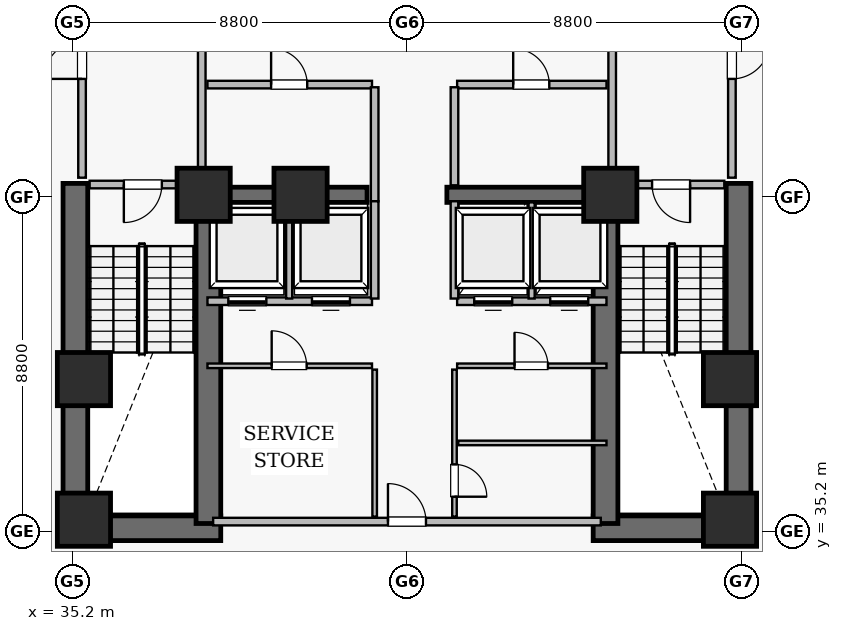
"""IFC4 building model, lengths in metres.
Left out: names, types, materials, properties, quantities, classifications, styles, units other than length and angle.
Written with IfcOpenShell. Run it as: python <this file> out.ifc"""

import sys

from ifc_helpers import new_model, si_unit, direction, frame, frame_2d, origin, origin_2d, place, context, subcontext, project, spatial, rectangle, extrude, element, fill, save


model = new_model("IFC4")
c1 = context("Model", 3, precision=1e-05, world=origin(), true_north=direction((0.0, 1.0)))
c2 = subcontext(c1, "Body", "Model", "MODEL_VIEW")
j1 = project(units=[si_unit("LENGTHUNIT", "METRE"), si_unit("PLANEANGLEUNIT", "RADIAN")], contexts=[c1])
p1 = place(None, origin())
s1 = spatial("IfcSite", under=j1, at=p1, CompositionType="ELEMENT")
p2 = place(p1, origin())
s2 = spatial("IfcBuilding", under=s1, at=p2, CompositionType="ELEMENT")
p3 = place(p2, frame((0.0, 0.0, -3.9)))
s3 = spatial("IfcBuildingStorey", under=s2, at=p3, CompositionType="ELEMENT", Elevation=-3.9)
for number, where, z_axis, x_axis in (
    (1, (34.95, 35.275, 0.0), (0.0, 0.0, 1.0), (1.0, 0.0, 0.0)),
    (2, (48.9, 35.275, 0.0), (0.0, 0.0, 1.0), (1.0, 0.0, 0.0)),
):
    element("IfcWall", number, at=place(p3, frame(where, z_axis=z_axis, x_axis=x_axis)), inside=s3, PredefinedType="SHEAR", context=c2, shape_type="SweptSolid", body=[
        extrude(rectangle(XDim=4.15, YDim=0.65, at=frame_2d((2.075, 0.0))), origin(), (0.0, 0.0, 1.0), 3.6),
    ])
for number, where, z_axis, x_axis in (
    (3, (35.275, 34.95, 0.0), (0.0, 0.0, 1.0), (0.0, 1.0, 0.0)),
    (4, (52.725, 34.95, 0.0), (0.0, 0.0, 1.0), (0.0, 1.0, 0.0)),
):
    element("IfcWall", number, at=place(p3, frame(where, z_axis=z_axis, x_axis=x_axis)), inside=s3, PredefinedType="SHEAR", context=c2, shape_type="SweptSolid", body=[
        extrude(rectangle(XDim=9.4, YDim=0.65, at=frame_2d((4.7, 0.0))), origin(), (0.0, 0.0, 1.0), 3.6),
    ])
for number, where, z_axis, x_axis in (
    (5, (38.775, 35.4, 0.0), (0.0, 0.0, 1.0), (0.0, 1.0, 0.0)),
    (6, (49.225, 35.4, 0.0), (0.0, 0.0, 1.0), (0.0, 1.0, 0.0)),
):
    element("IfcWall", number, at=place(p3, frame(where, z_axis=z_axis, x_axis=x_axis)), inside=s3, PredefinedType="SHEAR", context=c2, shape_type="SweptSolid", body=[
        extrude(rectangle(XDim=8.95, YDim=0.65, at=frame_2d((4.475, 0.0))), origin(), (0.0, 0.0, 1.0), 3.6),
    ])
for number, where, z_axis, x_axis in (
    (7, (38.75, 44.05, 0.0), (0.0, 0.0, 1.0), (1.0, 0.0, 0.0)),
    (8, (45.05, 44.05, 0.0), (0.0, 0.0, 1.0), (1.0, 0.0, 0.0)),
):
    element("IfcWall", number, at=place(p3, frame(where, z_axis=z_axis, x_axis=x_axis)), inside=s3, PredefinedType="SHEAR", context=c2, shape_type="SweptSolid", body=[
        extrude(rectangle(XDim=4.2, YDim=0.4, at=frame_2d((2.1, 0.0))), origin(), (0.0, 0.0, 1.0), 3.6),
    ])
for number, where, z_axis, x_axis in (
    (9, (35.5, 35.5, 0.0), (0.0, 0.0, 1.0), (1.0, 0.0, 0.0)),
    (10, (38.65, 44.05, 0.0), (0.0, 0.0, 1.0), (1.0, 0.0, 0.0)),
    (11, (52.5, 35.5, 0.0), (0.0, 0.0, 1.0), (1.0, 0.0, 0.0)),
    (12, (52.5, 39.2, 0.0), (0.0, 0.0, 1.0), (1.0, 0.0, 0.0)),
    (13, (49.35, 44.05, 0.0), (0.0, 0.0, 1.0), (1.0, 0.0, 0.0)),
    (14, (35.5, 39.2, 0.0), (0.0, 0.0, 1.0), (1.0, 0.0, 0.0)),
    (15, (41.2, 44.05, 0.0), (0.0, 0.0, 1.0), (1.0, 0.0, 0.0)),
):
    element("IfcColumn", number, at=place(p3, frame(where, z_axis=z_axis, x_axis=x_axis)), inside=s3, PredefinedType="COLUMN", context=c2, shape_type="SweptSolid", body=[
        extrude(rectangle(XDim=1.4, YDim=1.4, at=origin_2d()), origin(), (0.0, 0.0, 1.0), 3.9),
    ])
p4 = place(p3, frame((38.9, 35.45, 0.0), z_axis=(0.0, 0.0, 1.0), x_axis=(1.0, 0.0, 0.0)))
e16 = element("IfcWall", 16, at=p4, inside=s3, PredefinedType="SOLIDWALL", context=c2, shape_type="SweptSolid", body=[
    extrude(rectangle(XDim=10.2, YDim=0.2, at=frame_2d((5.1, 0.0))), origin(), (0.0, 0.0, 1.0), 3.6),
])
p5 = place(p4, frame((4.6, 0.0, 0.0)))
e17 = element("IfcOpeningElement", 17, at=p5, cuts=e16, PredefinedType="OPENING", context=c2, shape_type="SweptSolid", body=[
    extrude(rectangle(XDim=1.0, YDim=2.15, at=frame_2d((0.5, 1.075))), frame((0.0, 0.11, 0.0), z_axis=(0.0, -1.0, 0.0), x_axis=(1.0, 0.0, 0.0)), (0.0, 0.0, 1.0), 0.22),
])
p6 = place(p3, frame((35.45, 44.5, 0.0), z_axis=(0.0, 0.0, 1.0), x_axis=(0.0, 1.0, 0.0)))
e18 = element("IfcWall", 18, at=p6, inside=s3, PredefinedType="SOLIDWALL", context=c2, shape_type="SweptSolid", body=[
    extrude(rectangle(XDim=7.92, YDim=0.2, at=frame_2d((3.96, 0.0))), origin(), (0.0, 0.0, 1.0), 3.6),
])
p7 = place(p6, frame((2.6, 0.0, 0.0)))
e19 = element("IfcOpeningElement", 19, at=p7, cuts=e18, PredefinedType="OPENING", context=c2, shape_type="SweptSolid", body=[
    extrude(rectangle(XDim=1.0, YDim=2.15, at=frame_2d((0.5, 1.075))), frame((0.0, 0.11, 0.0), z_axis=(0.0, -1.0, 0.0), x_axis=(1.0, 0.0, 0.0)), (0.0, 0.0, 1.0), 0.22),
])
p8 = place(p3, frame((52.55, 44.5, 0.0), z_axis=(0.0, 0.0, 1.0), x_axis=(0.0, 1.0, 0.0)))
e20 = element("IfcWall", 20, at=p8, inside=s3, PredefinedType="SOLIDWALL", context=c2, shape_type="SweptSolid", body=[
    extrude(rectangle(XDim=7.92, YDim=0.2, at=frame_2d((3.96, 0.0))), origin(), (0.0, 0.0, 1.0), 3.6),
])
p9 = place(p8, frame((2.6, 0.0, 0.0)))
e21 = element("IfcOpeningElement", 21, at=p9, cuts=e20, PredefinedType="OPENING", context=c2, shape_type="SweptSolid", body=[
    extrude(rectangle(XDim=1.0, YDim=2.15, at=frame_2d((0.5, 1.075))), frame((0.0, 0.11, 0.0), z_axis=(0.0, -1.0, 0.0), x_axis=(1.0, 0.0, 0.0)), (0.0, 0.0, 1.0), 0.22),
])
p10 = place(p3, frame((38.6, 44.5, 0.0), z_axis=(0.0, 0.0, 1.0), x_axis=(0.0, 1.0, 0.0)))
e22 = element("IfcWall", 22, at=p10, inside=s3, PredefinedType="SOLIDWALL", context=c2, shape_type="SweptSolid", body=[
    extrude(rectangle(XDim=7.92, YDim=0.2, at=frame_2d((3.96, 0.0))), origin(), (0.0, 0.0, 1.0), 3.6),
])
p11 = place(p10, frame((3.425, 0.0, 0.0)))
e23 = element("IfcOpeningElement", 23, at=p11, cuts=e22, PredefinedType="OPENING", context=c2, shape_type="SweptSolid", body=[
    extrude(rectangle(XDim=0.95, YDim=2.15, at=frame_2d((0.475, 1.075))), frame((0.0, 0.11, 0.0), z_axis=(0.0, -1.0, 0.0), x_axis=(1.0, 0.0, 0.0)), (0.0, 0.0, 1.0), 0.22),
])
p12 = place(p3, frame((49.4, 44.5, 0.0), z_axis=(0.0, 0.0, 1.0), x_axis=(0.0, 1.0, 0.0)))
e24 = element("IfcWall", 24, at=p12, inside=s3, PredefinedType="SOLIDWALL", context=c2, shape_type="SweptSolid", body=[
    extrude(rectangle(XDim=7.92, YDim=0.2, at=frame_2d((3.96, 0.0))), origin(), (0.0, 0.0, 1.0), 3.6),
])
p13 = place(p12, frame((3.425, 0.0, 0.0)))
e25 = element("IfcOpeningElement", 25, at=p13, cuts=e24, PredefinedType="OPENING", context=c2, shape_type="SweptSolid", body=[
    extrude(rectangle(XDim=0.95, YDim=2.15, at=frame_2d((0.475, 1.075))), frame((0.0, 0.11, 0.0), z_axis=(0.0, -1.0, 0.0), x_axis=(1.0, 0.0, 0.0)), (0.0, 0.0, 1.0), 0.22),
])
p14 = place(p3, frame((38.75, 46.95, 0.0), z_axis=(0.0, 0.0, 1.0), x_axis=(1.0, 0.0, 0.0)))
e26 = element("IfcWall", 26, at=p14, inside=s3, PredefinedType="SOLIDWALL", context=c2, shape_type="SweptSolid", body=[
    extrude(rectangle(XDim=4.33, YDim=0.2, at=frame_2d((2.165, 0.0))), origin(), (0.0, 0.0, 1.0), 3.6),
])
p15 = place(p14, frame((1.675, 0.0, 0.0)))
e27 = element("IfcOpeningElement", 27, at=p15, cuts=e26, PredefinedType="OPENING", context=c2, shape_type="SweptSolid", body=[
    extrude(rectangle(XDim=0.95, YDim=2.15, at=frame_2d((0.475, 1.075))), frame((0.0, 0.11, 0.0), z_axis=(0.0, -1.0, 0.0), x_axis=(1.0, 0.0, 0.0)), (0.0, 0.0, 1.0), 0.22),
])
p16 = place(p3, frame((38.75, 41.25, 0.0), z_axis=(0.0, 0.0, 1.0), x_axis=(1.0, 0.0, 0.0)))
e28 = element("IfcWall", 28, at=p16, inside=s3, PredefinedType="SOLIDWALL", context=c2, shape_type="SweptSolid", body=[
    extrude(rectangle(XDim=4.33, YDim=0.2, at=frame_2d((2.165, 0.0))), origin(), (0.0, 0.0, 1.0), 3.6),
])
p17 = place(p16, frame((0.55, 0.0, 0.0)))
e29 = element("IfcOpeningElement", 29, at=p17, cuts=e28, PredefinedType="OPENING", context=c2, shape_type="SweptSolid", body=[
    extrude(rectangle(XDim=1.0, YDim=2.15, at=frame_2d((0.5, 1.075))), frame((0.0, 0.11, 0.0), z_axis=(0.0, -1.0, 0.0), x_axis=(1.0, 0.0, 0.0)), (0.0, 0.0, 1.0), 0.22),
])
p18 = place(p16, frame((2.75, 0.0, 0.0)))
e30 = element("IfcOpeningElement", 30, at=p18, cuts=e28, PredefinedType="OPENING", context=c2, shape_type="SweptSolid", body=[
    extrude(rectangle(XDim=1.0, YDim=2.15, at=frame_2d((0.5, 1.075))), frame((0.0, 0.11, 0.0), z_axis=(0.0, -1.0, 0.0), x_axis=(1.0, 0.0, 0.0)), (0.0, 0.0, 1.0), 0.22),
])
p19 = place(p3, frame((38.75, 39.55, 0.0), z_axis=(0.0, 0.0, 1.0), x_axis=(1.0, 0.0, 0.0)))
e31 = element("IfcWall", 31, at=p19, inside=s3, PredefinedType="PARTITIONING", context=c2, shape_type="SweptSolid", body=[
    extrude(rectangle(XDim=4.33, YDim=0.12, at=frame_2d((2.165, 0.0))), origin(), (0.0, 0.0, 1.0), 3.6),
])
p20 = place(p19, frame((1.69, 0.0, 0.0)))
e32 = element("IfcOpeningElement", 32, at=p20, cuts=e31, PredefinedType="OPENING", context=c2, shape_type="SweptSolid", body=[
    extrude(rectangle(XDim=0.92, YDim=2.1, at=frame_2d((0.46, 1.05))), frame((0.0, 0.07, 0.0), z_axis=(0.0, -1.0, 0.0), x_axis=(1.0, 0.0, 0.0)), (0.0, 0.0, 1.0), 0.14),
])
p21 = place(p3, frame((45.32, 46.95, 0.0), z_axis=(0.0, 0.0, 1.0), x_axis=(1.0, 0.0, 0.0)))
e33 = element("IfcWall", 33, at=p21, inside=s3, PredefinedType="SOLIDWALL", context=c2, shape_type="SweptSolid", body=[
    extrude(rectangle(XDim=3.93, YDim=0.2, at=frame_2d((1.965, 0.0))), origin(), (0.0, 0.0, 1.0), 2.938),
])
p22 = place(p21, frame((1.475, 0.0, 0.0)))
e34 = element("IfcOpeningElement", 34, at=p22, cuts=e33, PredefinedType="OPENING", context=c2, shape_type="SweptSolid", body=[
    extrude(rectangle(XDim=0.95, YDim=2.15, at=frame_2d((0.475, 1.075))), frame((0.0, 0.11, 0.0), z_axis=(0.0, -1.0, 0.0), x_axis=(1.0, 0.0, 0.0)), (0.0, 0.0, 1.0), 0.22),
])
p23 = place(p3, frame((45.32, 41.25, 0.0), z_axis=(0.0, 0.0, 1.0), x_axis=(1.0, 0.0, 0.0)))
e35 = element("IfcWall", 35, at=p23, inside=s3, PredefinedType="SOLIDWALL", context=c2, shape_type="SweptSolid", body=[
    extrude(rectangle(XDim=3.93, YDim=0.2, at=frame_2d((1.965, 0.0))), origin(), (0.0, 0.0, 1.0), 3.6),
])
p24 = place(p23, frame((0.45, 0.0, 0.0)))
e36 = element("IfcOpeningElement", 36, at=p24, cuts=e35, PredefinedType="OPENING", context=c2, shape_type="SweptSolid", body=[
    extrude(rectangle(XDim=1.0, YDim=2.15, at=frame_2d((0.5, 1.075))), frame((0.0, 0.11, 0.0), z_axis=(0.0, -1.0, 0.0), x_axis=(1.0, 0.0, 0.0)), (0.0, 0.0, 1.0), 0.22),
])
p25 = place(p23, frame((2.45, 0.0, 0.0)))
e37 = element("IfcOpeningElement", 37, at=p25, cuts=e35, PredefinedType="OPENING", context=c2, shape_type="SweptSolid", body=[
    extrude(rectangle(XDim=1.0, YDim=2.15, at=frame_2d((0.5, 1.075))), frame((0.0, 0.11, 0.0), z_axis=(0.0, -1.0, 0.0), x_axis=(1.0, 0.0, 0.0)), (0.0, 0.0, 1.0), 0.22),
])
p26 = place(p3, frame((45.32, 39.55, 0.0), z_axis=(0.0, 0.0, 1.0), x_axis=(1.0, 0.0, 0.0)))
e38 = element("IfcWall", 38, at=p26, inside=s3, PredefinedType="PARTITIONING", context=c2, shape_type="SweptSolid", body=[
    extrude(rectangle(XDim=3.93, YDim=0.12, at=frame_2d((1.965, 0.0))), origin(), (0.0, 0.0, 1.0), 3.6),
])
p27 = place(p26, frame((1.51, 0.0, 0.0)))
e39 = element("IfcOpeningElement", 39, at=p27, cuts=e38, PredefinedType="OPENING", context=c2, shape_type="SweptSolid", body=[
    extrude(rectangle(XDim=0.88, YDim=2.1, at=frame_2d((0.44, 1.05))), frame((0.0, 0.07, 0.0), z_axis=(0.0, -1.0, 0.0), x_axis=(1.0, 0.0, 0.0)), (0.0, 0.0, 1.0), 0.14),
])
p28 = place(p3, frame((45.25, 35.58, 0.0), z_axis=(0.0, 0.0, 1.0), x_axis=(0.0, 1.0, 0.0)))
e40 = element("IfcWall", 40, at=p28, inside=s3, PredefinedType="PARTITIONING", context=c2, shape_type="SweptSolid", body=[
    extrude(rectangle(XDim=3.87, YDim=0.12, at=frame_2d((1.935, 0.0))), origin(), (0.0, 0.0, 1.0), 3.6),
])
p29 = place(p28, frame((0.525, 0.0, 0.0)))
e41 = element("IfcOpeningElement", 41, at=p29, cuts=e40, PredefinedType="OPENING", context=c2, shape_type="SweptSolid", body=[
    extrude(rectangle(XDim=0.85, YDim=2.1, at=frame_2d((0.425, 1.05))), frame((0.0, 0.07, 0.0), z_axis=(0.0, -1.0, 0.0), x_axis=(1.0, 0.0, 0.0)), (0.0, 0.0, 1.0), 0.14),
])
p30 = place(p3, frame((35.65, 44.32, 0.0), z_axis=(0.0, 0.0, 1.0), x_axis=(1.0, 0.0, 0.0)))
e42 = element("IfcWall", 42, at=p30, inside=s3, PredefinedType="SOLIDWALL", context=c2, shape_type="SweptSolid", body=[
    extrude(rectangle(XDim=2.8, YDim=0.2, at=frame_2d((1.4, 0.0))), origin(), (0.0, 0.0, 1.0), 3.6),
])
p31 = place(p30, frame((0.9, 0.0, 0.0)))
e43 = element("IfcOpeningElement", 43, at=p31, cuts=e42, PredefinedType="OPENING", context=c2, shape_type="SweptSolid", body=[
    extrude(rectangle(XDim=1.0, YDim=2.15, at=frame_2d((0.5, 1.075))), frame((0.0, 0.11, 0.0), z_axis=(0.0, -1.0, 0.0), x_axis=(1.0, 0.0, 0.0)), (0.0, 0.0, 1.0), 0.22),
])
p32 = place(p3, frame((49.55, 44.32, 0.0), z_axis=(0.0, 0.0, 1.0), x_axis=(1.0, 0.0, 0.0)))
e44 = element("IfcWall", 44, at=p32, inside=s3, PredefinedType="SOLIDWALL", context=c2, shape_type="SweptSolid", body=[
    extrude(rectangle(XDim=2.8, YDim=0.2, at=frame_2d((1.4, 0.0))), origin(), (0.0, 0.0, 1.0), 3.6),
])
p33 = place(p32, frame((0.9, 0.0, 0.0)))
e45 = element("IfcOpeningElement", 45, at=p33, cuts=e44, PredefinedType="OPENING", context=c2, shape_type="SweptSolid", body=[
    extrude(rectangle(XDim=1.0, YDim=2.15, at=frame_2d((0.5, 1.075))), frame((0.0, 0.11, 0.0), z_axis=(0.0, -1.0, 0.0), x_axis=(1.0, 0.0, 0.0)), (0.0, 0.0, 1.0), 0.22),
])
p34 = place(p3, frame((45.35, 37.52, 0.0), z_axis=(0.0, 0.0, 1.0), x_axis=(1.0, 0.0, 0.0)))
e46 = element("IfcWall", 46, at=p34, inside=s3, PredefinedType="PARTITIONING", context=c2, shape_type="SweptSolid", body=[
    extrude(rectangle(XDim=3.9, YDim=0.12, at=frame_2d((1.95, 0.0))), origin(), (0.0, 0.0, 1.0), 3.6),
])
p35 = place(p3, frame((43.15, 35.58, 0.0), z_axis=(0.0, 0.0, 1.0), x_axis=(0.0, 1.0, 0.0)))
e47 = element("IfcWall", 47, at=p35, inside=s3, PredefinedType="PARTITIONING", context=c2, shape_type="SweptSolid", body=[
    extrude(rectangle(XDim=3.87, YDim=0.12, at=frame_2d((1.935, 0.0))), origin(), (0.0, 0.0, 1.0), 3.6),
])
p36 = place(p3, frame((43.15, 43.88, 0.0), z_axis=(0.0, 0.0, 1.0), x_axis=(0.0, 1.0, 0.0)))
e48 = element("IfcWall", 48, at=p36, inside=s3, PredefinedType="SOLIDWALL", context=c2, shape_type="SweptSolid", body=[
    extrude(rectangle(XDim=3.0, YDim=0.2, at=frame_2d((1.5, 0.0))), origin(), (0.0, 0.0, 1.0), 3.6),
])
p37 = place(p3, frame((45.25, 44.3, 0.0), z_axis=(0.0, 0.0, 1.0), x_axis=(0.0, 1.0, 0.0)))
e49 = element("IfcWall", 49, at=p37, inside=s3, PredefinedType="SOLIDWALL", context=c2, shape_type="SweptSolid", body=[
    extrude(rectangle(XDim=2.58, YDim=0.2, at=frame_2d((1.29, 0.0))), origin(), (0.0, 0.0, 1.0), 3.6),
])
for number, where, z_axis, x_axis in (
    (50, (43.15, 41.32, 0.0), (0.0, 0.0, 1.0), (0.0, 1.0, 0.0)),
    (51, (45.25, 41.32, 0.0), (0.0, 0.0, 1.0), (0.0, 1.0, 0.0)),
):
    element("IfcWall", number, at=place(p3, frame(where, z_axis=z_axis, x_axis=x_axis)), inside=s3, PredefinedType="SOLIDWALL", context=c2, shape_type="SweptSolid", body=[
        extrude(rectangle(XDim=2.56, YDim=0.2, at=frame_2d((1.28, 0.0))), origin(), (0.0, 0.0, 1.0), 3.6),
    ])
for number, where, z_axis, x_axis in (
    (52, (40.9, 41.32, 0.0), (0.0, 0.0, 1.0), (0.0, 1.0, 0.0)),
    (53, (47.28, 41.32, 0.0), (0.0, 0.0, 1.0), (0.0, 1.0, 0.0)),
):
    element("IfcWall", number, at=place(p3, frame(where, z_axis=z_axis, x_axis=x_axis)), inside=s3, PredefinedType="SOLIDWALL", context=c2, shape_type="SweptSolid", body=[
        extrude(rectangle(XDim=2.53, YDim=0.16, at=frame_2d((1.265, 0.0))), origin(), (0.0, 0.0, 1.0), 3.6),
    ])
p38 = place(p31, frame((1.0, 0.0, 0.0), z_axis=(0.0, 0.0, 1.0), x_axis=(-1.0, 0.0, 0.0)))
e54 = element("IfcDoor", 54, at=p38, inside=s3, OperationType="SINGLE_SWING_LEFT", PredefinedType="DOOR", context=c2, shape_type="SweptSolid", body=[
    extrude(rectangle(XDim=1.0, YDim=2.15, at=frame_2d((0.5, 1.075))), frame((0.0, 0.025, 0.0), z_axis=(0.0, -1.0, 0.0), x_axis=(1.0, 0.0, 0.0)), (0.0, 0.0, 1.0), 0.05),
])
fill(e43, e54)
p39 = place(p33, frame((1.0, 0.0, 0.0), z_axis=(0.0, 0.0, 1.0), x_axis=(-1.0, 0.0, 0.0)))
e55 = element("IfcDoor", 55, at=p39, inside=s3, OperationType="SINGLE_SWING_RIGHT", PredefinedType="DOOR", context=c2, shape_type="SweptSolid", body=[
    extrude(rectangle(XDim=1.0, YDim=2.15, at=frame_2d((0.5, 1.075))), frame((0.0, 0.025, 0.0), z_axis=(0.0, -1.0, 0.0), x_axis=(1.0, 0.0, 0.0)), (0.0, 0.0, 1.0), 0.05),
])
fill(e45, e55)
p40 = place(p7, origin())
e56 = element("IfcDoor", 56, at=p40, inside=s3, OperationType="SINGLE_SWING_LEFT", PredefinedType="DOOR", context=c2, shape_type="SweptSolid", body=[
    extrude(rectangle(XDim=1.0, YDim=2.15, at=frame_2d((0.5, 1.075))), frame((0.0, 0.025, 0.0), z_axis=(0.0, -1.0, 0.0), x_axis=(1.0, 0.0, 0.0)), (0.0, 0.0, 1.0), 0.05),
])
fill(e19, e56)
p41 = place(p9, frame((1.0, 0.0, 0.0), z_axis=(0.0, 0.0, 1.0), x_axis=(-1.0, 0.0, 0.0)))
e57 = element("IfcDoor", 57, at=p41, inside=s3, OperationType="SINGLE_SWING_RIGHT", PredefinedType="DOOR", context=c2, shape_type="SweptSolid", body=[
    extrude(rectangle(XDim=1.0, YDim=2.15, at=frame_2d((0.5, 1.075))), frame((0.0, 0.025, 0.0), z_axis=(0.0, -1.0, 0.0), x_axis=(1.0, 0.0, 0.0)), (0.0, 0.0, 1.0), 0.05),
])
fill(e21, e57)
p42 = place(p5, origin())
e58 = element("IfcDoor", 58, at=p42, inside=s3, OperationType="SINGLE_SWING_LEFT", PredefinedType="DOOR", context=c2, shape_type="SweptSolid", body=[
    extrude(rectangle(XDim=1.0, YDim=2.15, at=frame_2d((0.5, 1.075))), frame((0.0, 0.025, 0.0), z_axis=(0.0, -1.0, 0.0), x_axis=(1.0, 0.0, 0.0)), (0.0, 0.0, 1.0), 0.05),
])
fill(e17, e58)
p43 = place(p15, origin())
e59 = element("IfcDoor", 59, at=p43, inside=s3, OperationType="SINGLE_SWING_LEFT", PredefinedType="DOOR", context=c2, shape_type="SweptSolid", body=[
    extrude(rectangle(XDim=0.95, YDim=2.15, at=frame_2d((0.475, 1.075))), frame((0.0, 0.025, 0.0), z_axis=(0.0, -1.0, 0.0), x_axis=(1.0, 0.0, 0.0)), (0.0, 0.0, 1.0), 0.05),
])
fill(e27, e59)
p44 = place(p22, origin())
e60 = element("IfcDoor", 60, at=p44, inside=s3, OperationType="SINGLE_SWING_LEFT", PredefinedType="DOOR", context=c2, shape_type="SweptSolid", body=[
    extrude(rectangle(XDim=0.95, YDim=2.15, at=frame_2d((0.475, 1.075))), frame((0.0, 0.025, 0.0), z_axis=(0.0, -1.0, 0.0), x_axis=(1.0, 0.0, 0.0)), (0.0, 0.0, 1.0), 0.05),
])
fill(e34, e60)
p45 = place(p17, frame((1.0, 0.0, 0.0), z_axis=(0.0, 0.0, 1.0), x_axis=(-1.0, 0.0, 0.0)))
e61 = element("IfcDoor", 61, at=p45, inside=s3, OperationType="SLIDING_TO_LEFT", PredefinedType="DOOR", context=c2, shape_type="SweptSolid", body=[
    extrude(rectangle(XDim=1.0, YDim=2.15, at=frame_2d((0.5, 1.075))), frame((0.0, 0.025, 0.0), z_axis=(0.0, -1.0, 0.0), x_axis=(1.0, 0.0, 0.0)), (0.0, 0.0, 1.0), 0.05),
])
fill(e29, e61)
p46 = place(p18, frame((1.0, 0.0, 0.0), z_axis=(0.0, 0.0, 1.0), x_axis=(-1.0, 0.0, 0.0)))
e62 = element("IfcDoor", 62, at=p46, inside=s3, OperationType="SLIDING_TO_LEFT", PredefinedType="DOOR", context=c2, shape_type="SweptSolid", body=[
    extrude(rectangle(XDim=1.0, YDim=2.15, at=frame_2d((0.5, 1.075))), frame((0.0, 0.025, 0.0), z_axis=(0.0, -1.0, 0.0), x_axis=(1.0, 0.0, 0.0)), (0.0, 0.0, 1.0), 0.05),
])
fill(e30, e62)
p47 = place(p24, frame((1.0, 0.0, 0.0), z_axis=(0.0, 0.0, 1.0), x_axis=(-1.0, 0.0, 0.0)))
e63 = element("IfcDoor", 63, at=p47, inside=s3, OperationType="SLIDING_TO_LEFT", PredefinedType="DOOR", context=c2, shape_type="SweptSolid", body=[
    extrude(rectangle(XDim=1.0, YDim=2.15, at=frame_2d((0.5, 1.075))), frame((0.0, 0.025, 0.0), z_axis=(0.0, -1.0, 0.0), x_axis=(1.0, 0.0, 0.0)), (0.0, 0.0, 1.0), 0.05),
])
fill(e36, e63)
p48 = place(p25, frame((1.0, 0.0, 0.0), z_axis=(0.0, 0.0, 1.0), x_axis=(-1.0, 0.0, 0.0)))
e64 = element("IfcDoor", 64, at=p48, inside=s3, OperationType="SLIDING_TO_LEFT", PredefinedType="DOOR", context=c2, shape_type="SweptSolid", body=[
    extrude(rectangle(XDim=1.0, YDim=2.15, at=frame_2d((0.5, 1.075))), frame((0.0, 0.025, 0.0), z_axis=(0.0, -1.0, 0.0), x_axis=(1.0, 0.0, 0.0)), (0.0, 0.0, 1.0), 0.05),
])
fill(e37, e64)
p49 = place(p29, frame((0.85, 0.0, 0.0), z_axis=(0.0, 0.0, 1.0), x_axis=(-1.0, 0.0, 0.0)))
e65 = element("IfcDoor", 65, at=p49, inside=s3, OperationType="SINGLE_SWING_LEFT", PredefinedType="DOOR", context=c2, shape_type="SweptSolid", body=[
    extrude(rectangle(XDim=0.85, YDim=2.1, at=frame_2d((0.425, 1.05))), frame((0.0, 0.025, 0.0), z_axis=(0.0, -1.0, 0.0), x_axis=(1.0, 0.0, 0.0)), (0.0, 0.0, 1.0), 0.05),
])
fill(e41, e65)
p50 = place(p20, origin())
e66 = element("IfcDoor", 66, at=p50, inside=s3, OperationType="SINGLE_SWING_LEFT", PredefinedType="DOOR", context=c2, shape_type="SweptSolid", body=[
    extrude(rectangle(XDim=0.92, YDim=2.1, at=frame_2d((0.46, 1.05))), frame((0.0, 0.025, 0.0), z_axis=(0.0, -1.0, 0.0), x_axis=(1.0, 0.0, 0.0)), (0.0, 0.0, 1.0), 0.05),
])
fill(e32, e66)
p51 = place(p27, origin())
e67 = element("IfcDoor", 67, at=p51, inside=s3, OperationType="SINGLE_SWING_LEFT", PredefinedType="DOOR", context=c2, shape_type="SweptSolid", body=[
    extrude(rectangle(XDim=0.88, YDim=2.1, at=frame_2d((0.44, 1.05))), frame((0.0, 0.025, 0.0), z_axis=(0.0, -1.0, 0.0), x_axis=(1.0, 0.0, 0.0)), (0.0, 0.0, 1.0), 0.05),
])
fill(e39, e67)
save(model, sys.argv[1])
